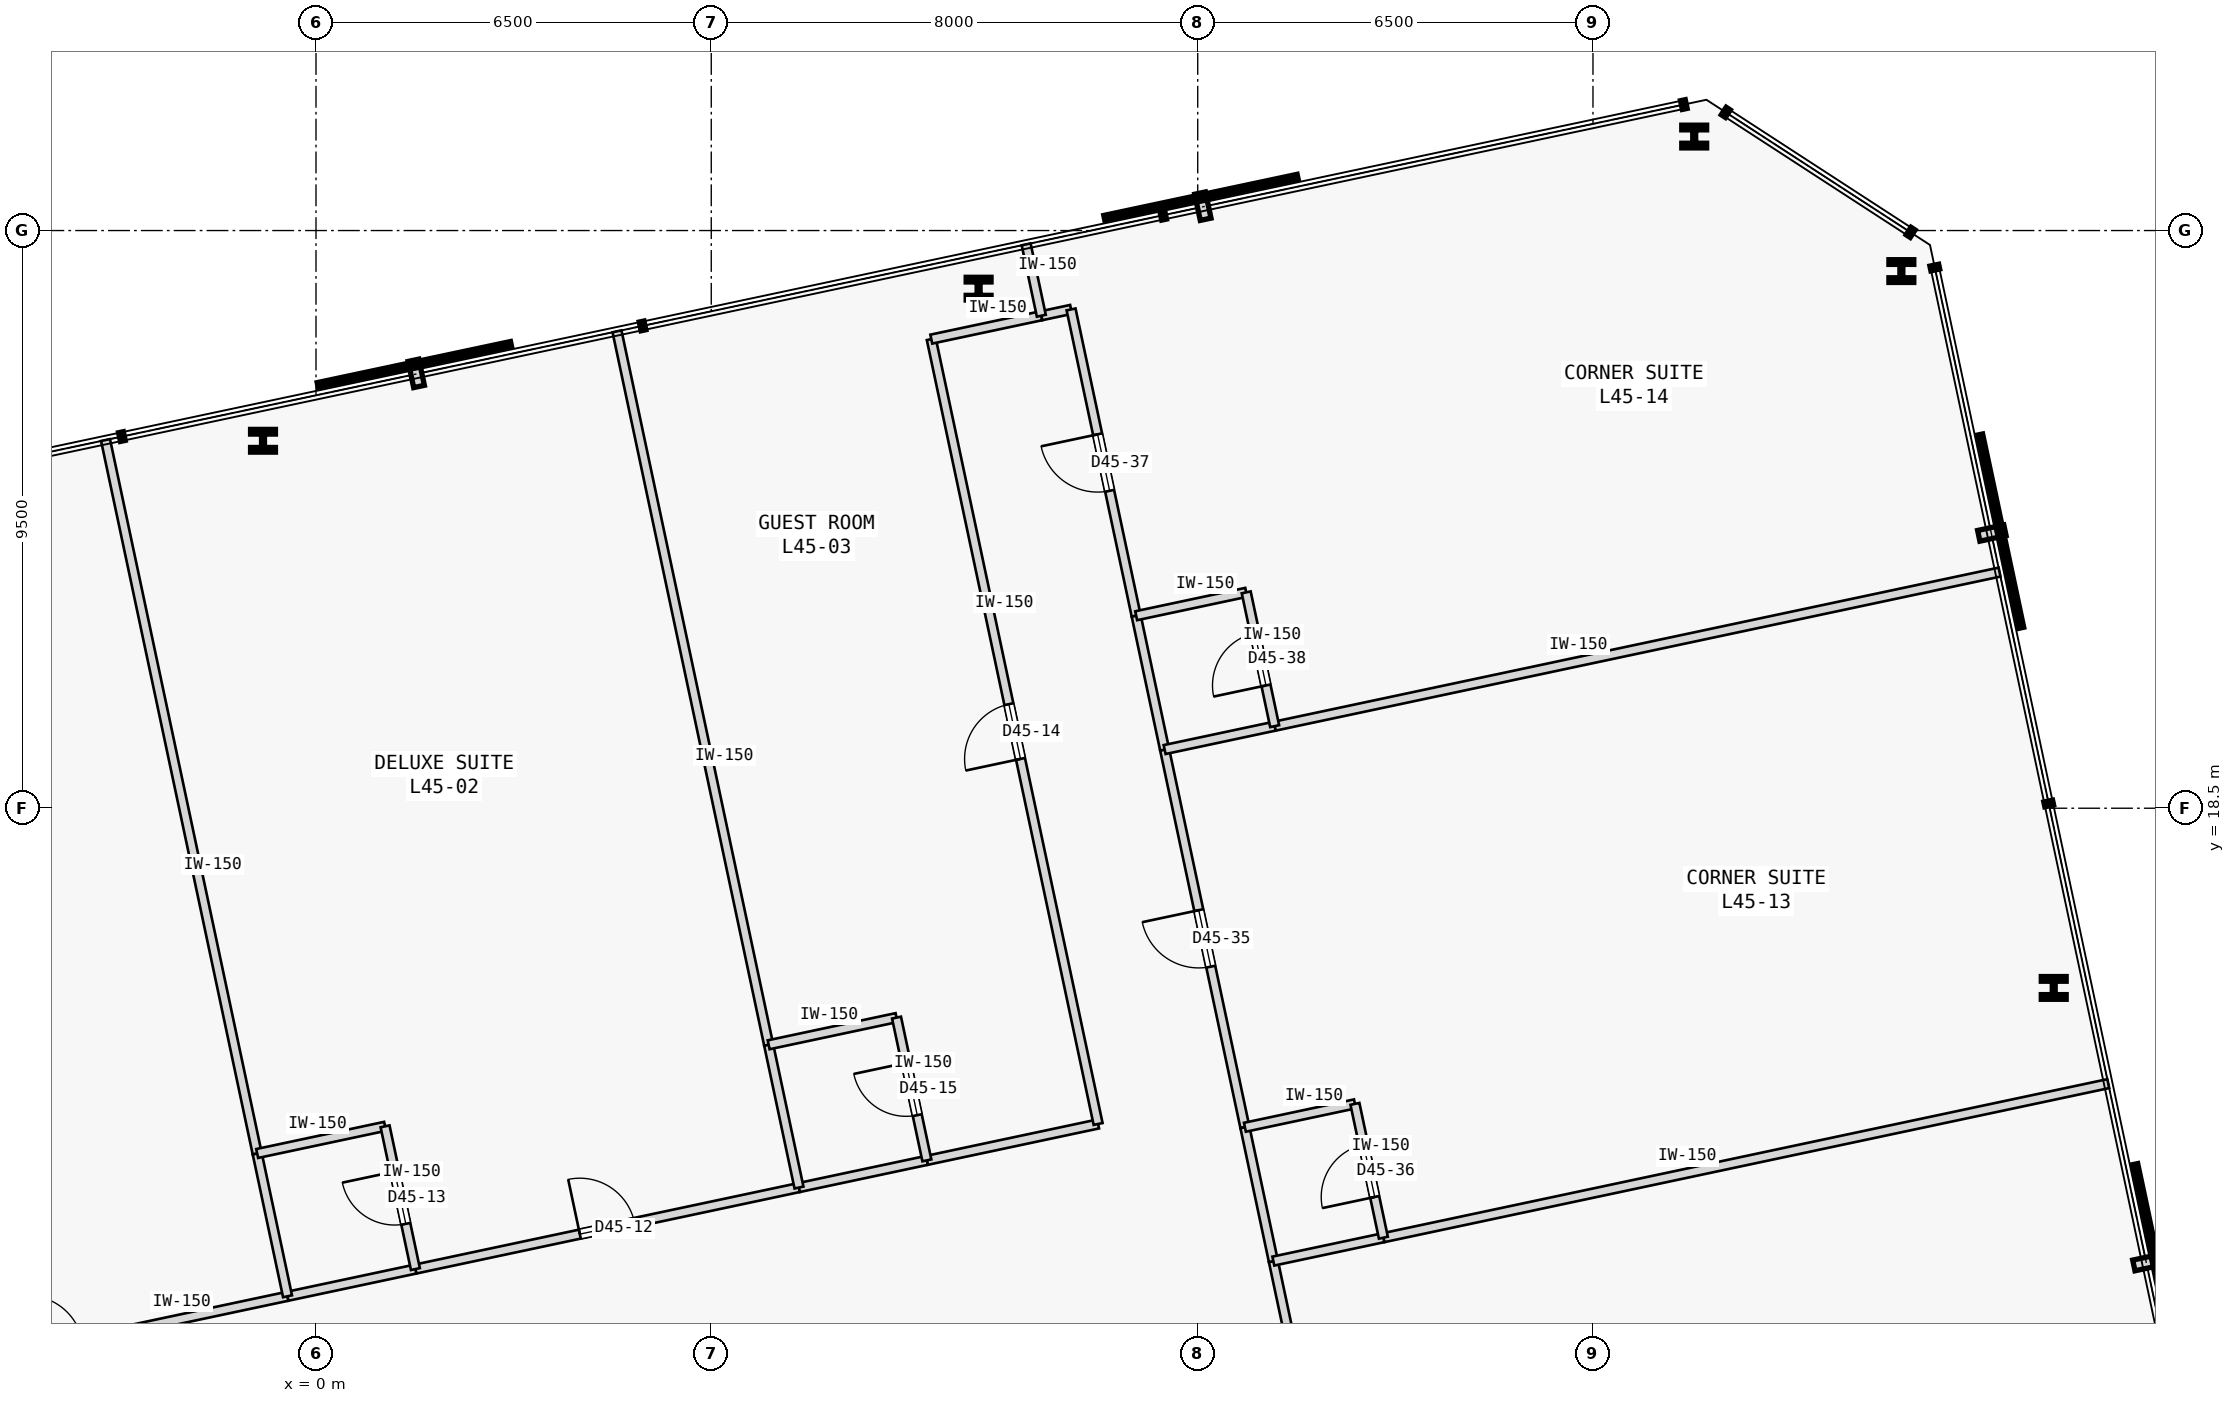
"""IFC4 building model, lengths in metres.
Left out: names, types, materials, properties, quantities, classifications, styles, units other than length and angle.
Written with IfcOpenShell. Run it as: python <this file> out.ifc"""

import sys

from ifc_helpers import new_model, si_unit, direction, frame, frame_2d, origin, origin_2d, place, context, subcontext, project, spatial, rectangle, i_section, extrude, element, fill, save


model = new_model("IFC4")
c1 = context("Model", 3, precision=1e-05, world=origin(), true_north=direction((0.0, 1.0)))
c2 = subcontext(c1, "Body", "Model", "MODEL_VIEW")
j1 = project(units=[si_unit("LENGTHUNIT", "METRE"), si_unit("PLANEANGLEUNIT", "RADIAN")], contexts=[c1])
p1 = place(None, origin())
s1 = spatial("IfcSite", under=j1, at=p1, CompositionType="ELEMENT")
p2 = place(p1, origin())
s2 = spatial("IfcBuilding", under=s1, at=p2, CompositionType="ELEMENT")
p3 = place(p2, frame((0.0, 0.0, 175.2)))
s3 = spatial("IfcBuildingStorey", under=s2, at=p3, CompositionType="ELEMENT", Elevation=175.2)
for number, where, z_axis, x_axis in (
    (1, (28.577, 15.545, 0.0), (0.0, 0.0, 1.0), (1.0, 0.0, 0.0)),
    (2, (26.071, 27.333, 0.0), (0.0, 0.0, 1.0), (1.0, 0.0, 0.0)),
    (3, (22.665, 29.546, 0.0), (0.0, 0.0, 1.0), (1.0, 0.0, 0.0)),
    (4, (10.896, 27.044, 0.0), (0.0, 0.0, 1.0), (1.0, 0.0, 0.0)),
    (5, (-0.872, 24.543, 0.0), (0.0, 0.0, 1.0), (1.0, 0.0, 0.0)),
):
    element("IfcColumn", number, at=place(p3, frame(where, z_axis=z_axis, x_axis=x_axis)), inside=s3, PredefinedType="COLUMN", context=c2, shape_type="SweptSolid", body=[
        extrude(i_section(OverallWidth=0.409, OverallDepth=0.374, WebThickness=0.048, FlangeThickness=0.077, FilletRadius=0.015, at=origin_2d()), origin(), (0.0, 0.0, 1.0), 3.4),
    ])
p4 = place(p3, frame((-8.121, 8.848, 0.0), z_axis=(0.0, 0.0, 1.0), x_axis=(0.978146318695, 0.207917722244, 0.0)))
e6 = element("IfcWall", 6, at=p4, inside=s3, PredefinedType="PARTITIONING", context=c2, shape_type="SweptSolid", body=[
    extrude(rectangle(XDim=7.824, YDim=0.15, at=frame_2d((3.912, 0.0))), origin(), (0.0, 0.0, 1.0), 3.175),
])
p5 = place(p4, frame((3.452, 0.0, 0.0)))
e7 = element("IfcOpeningElement", 7, at=p5, cuts=e6, PredefinedType="OPENING", context=c2, shape_type="SweptSolid", body=[
    extrude(rectangle(XDim=0.92, YDim=2.15, at=frame_2d((0.46, 1.075))), frame((0.0, 0.085, 0.0), z_axis=(0.0, -1.0, 0.0), x_axis=(1.0, 0.0, 0.0)), (0.0, 0.0, 1.0), 0.17),
])
p6 = place(p3, frame((1.635, 10.921, 0.0), z_axis=(0.0, 0.0, 1.0), x_axis=(0.978147881284, 0.207910370927, 0.0)))
e8 = element("IfcWall", 8, at=p6, inside=s3, PredefinedType="PARTITIONING", context=c2, shape_type="SweptSolid", body=[
    extrude(rectangle(XDim=6.449, YDim=0.15, at=frame_2d((3.225, 0.0))), origin(), (0.0, 0.0, 1.0), 3.175),
])
p7 = place(p6, frame((2.764, 0.0, 0.0)))
e9 = element("IfcOpeningElement", 9, at=p7, cuts=e8, PredefinedType="OPENING", context=c2, shape_type="SweptSolid", body=[
    extrude(rectangle(XDim=0.92, YDim=2.15, at=frame_2d((0.46, 1.075))), frame((0.0, 0.085, 0.0), z_axis=(0.0, -1.0, 0.0), x_axis=(1.0, 0.0, 0.0)), (0.0, 0.0, 1.0), 0.17),
])
p8 = place(p3, frame((-0.469, 10.474, 0.0), z_axis=(0.0, 0.0, 1.0), x_axis=(0.978146728319, 0.207915795165, 0.0)))
e10 = element("IfcWall", 10, at=p8, inside=s3, PredefinedType="PARTITIONING", context=c2, shape_type="SweptSolid", body=[
    extrude(rectangle(XDim=2.15, YDim=0.15, at=frame_2d((1.075, 0.0))), origin(), (0.0, 0.0, 1.0), 3.175),
])
p9 = place(p3, frame((10.046, 12.709, 0.0), z_axis=(0.0, 0.0, 1.0), x_axis=(0.97816208355, 0.207843542851, 0.0)))
e11 = element("IfcWall", 11, at=p9, inside=s3, PredefinedType="PARTITIONING", context=c2, shape_type="SweptSolid", body=[
    extrude(rectangle(XDim=2.879, YDim=0.15, at=frame_2d((1.439, 0.0))), origin(), (0.0, 0.0, 1.0), 3.175),
])
p10 = place(p3, frame((12.862, 13.308, 0.0), z_axis=(0.0, 0.0, 1.0), x_axis=(-0.207911421929, 0.978147657888, 0.0)))
e12 = element("IfcWall", 12, at=p10, inside=s3, PredefinedType="PARTITIONING", context=c2, shape_type="SweptSolid", body=[
    extrude(rectangle(XDim=13.195, YDim=0.15, at=frame_2d((6.598, 0.0))), origin(), (0.0, 0.0, 1.0), 3.175),
])
p11 = place(p10, frame((6.137, 0.0, 0.0)))
e13 = element("IfcOpeningElement", 13, at=p11, cuts=e12, PredefinedType="OPENING", context=c2, shape_type="SweptSolid", body=[
    extrude(rectangle(XDim=0.92, YDim=2.15, at=frame_2d((0.46, 1.075))), frame((0.0, 0.085, 0.0), z_axis=(0.0, -1.0, 0.0), x_axis=(1.0, 0.0, 0.0)), (0.0, 0.0, 1.0), 0.17),
])
p12 = place(p3, frame((10.118, 26.214, 0.0), z_axis=(0.0, 0.0, 1.0), x_axis=(0.978133353907, 0.20797870558, 0.0)))
e14 = element("IfcWall", 14, at=p12, inside=s3, PredefinedType="PARTITIONING", context=c2, shape_type="SweptSolid", body=[
    extrude(rectangle(XDim=1.85, YDim=0.15, at=frame_2d((0.925, 0.0))), origin(), (0.0, 0.0, 1.0), 3.175),
])
p13 = place(p3, frame((7.943, 12.262, 0.0), z_axis=(0.0, 0.0, 1.0), x_axis=(0.978146728319, 0.207915795165, 0.0)))
e15 = element("IfcWall", 15, at=p13, inside=s3, PredefinedType="PARTITIONING", context=c2, shape_type="SweptSolid", body=[
    extrude(rectangle(XDim=2.15, YDim=0.15, at=frame_2d((1.075, 0.0))), origin(), (0.0, 0.0, 1.0), 3.175),
])
p14 = place(p3, frame((17.064, 4.841, 0.0), z_axis=(0.0, 0.0, 1.0), x_axis=(-0.207924511115, 0.978144875608, 0.0)))
e16 = element("IfcWall", 16, at=p14, inside=s3, PredefinedType="PARTITIONING", context=c2, shape_type="SweptSolid", body=[
    extrude(rectangle(XDim=6.35, YDim=0.15, at=frame_2d((3.175, 0.0))), origin(), (0.0, 0.0, 1.0), 3.175),
])
p15 = place(p14, frame((2.7, 0.0, 0.0)))
e17 = element("IfcOpeningElement", 17, at=p15, cuts=e16, PredefinedType="OPENING", context=c2, shape_type="SweptSolid", body=[
    extrude(rectangle(XDim=0.95, YDim=2.15, at=frame_2d((0.475, 1.075))), frame((0.0, 0.085, 0.0), z_axis=(0.0, -1.0, 0.0), x_axis=(1.0, 0.0, 0.0)), (0.0, 0.0, 1.0), 0.17),
])
p16 = place(p3, frame((15.276, 13.253, 0.0), z_axis=(0.0, 0.0, 1.0), x_axis=(-0.207924511115, 0.978144875608, 0.0)))
e18 = element("IfcWall", 18, at=p16, inside=s3, PredefinedType="PARTITIONING", context=c2, shape_type="SweptSolid", body=[
    extrude(rectangle(XDim=6.35, YDim=0.15, at=frame_2d((3.175, 0.0))), origin(), (0.0, 0.0, 1.0), 3.175),
])
p17 = place(p16, frame((2.7, 0.0, 0.0)))
e19 = element("IfcOpeningElement", 19, at=p17, cuts=e18, PredefinedType="OPENING", context=c2, shape_type="SweptSolid", body=[
    extrude(rectangle(XDim=0.95, YDim=2.15, at=frame_2d((0.475, 1.075))), frame((0.0, 0.085, 0.0), z_axis=(0.0, -1.0, 0.0), x_axis=(1.0, 0.0, 0.0)), (0.0, 0.0, 1.0), 0.17),
])
p18 = place(p3, frame((15.744, 11.052, 0.0), z_axis=(0.0, 0.0, 1.0), x_axis=(-0.207891197838, 0.978151956427, 0.0)))
e20 = element("IfcWall", 20, at=p18, inside=s3, PredefinedType="PARTITIONING", context=c2, shape_type="SweptSolid", body=[
    extrude(rectangle(XDim=2.25, YDim=0.15, at=frame_2d((1.125, 0.0))), origin(), (0.0, 0.0, 1.0), 3.175),
])
p19 = place(p3, frame((11.928, 26.599, 0.0), z_axis=(0.0, 0.0, 1.0), x_axis=(0.97822210712, 0.207560856478, 0.0)))
e21 = element("IfcWall", 21, at=p19, inside=s3, PredefinedType="PARTITIONING", context=c2, shape_type="SweptSolid", body=[
    extrude(rectangle(XDim=0.5, YDim=0.15, at=frame_2d((0.25, 0.0))), origin(), (0.0, 0.0, 1.0), 3.175),
])
p20 = place(p3, frame((13.488, 21.666, 0.0), z_axis=(0.0, 0.0, 1.0), x_axis=(-0.207926226209, 0.978144511028, 0.0)))
e22 = element("IfcWall", 22, at=p20, inside=s3, PredefinedType="PARTITIONING", context=c2, shape_type="SweptSolid", body=[
    extrude(rectangle(XDim=5.15, YDim=0.15, at=frame_2d((2.575, 0.0))), origin(), (0.0, 0.0, 1.0), 3.175),
])
p21 = place(p20, frame((2.1, 0.0, 0.0)))
e23 = element("IfcOpeningElement", 23, at=p21, cuts=e22, PredefinedType="OPENING", context=c2, shape_type="SweptSolid", body=[
    extrude(rectangle(XDim=0.95, YDim=2.15, at=frame_2d((0.475, 1.075))), frame((0.0, 0.085, 0.0), z_axis=(0.0, -1.0, 0.0), x_axis=(1.0, 0.0, 0.0)), (0.0, 0.0, 1.0), 0.17),
])
p22 = place(p3, frame((13.956, 19.465, 0.0), z_axis=(0.0, 0.0, 1.0), x_axis=(-0.207891197838, 0.978151956427, 0.0)))
e24 = element("IfcWall", 24, at=p22, inside=s3, PredefinedType="PARTITIONING", context=c2, shape_type="SweptSolid", body=[
    extrude(rectangle(XDim=2.25, YDim=0.15, at=frame_2d((1.125, 0.0))), origin(), (0.0, 0.0, 1.0), 3.175),
])
p23 = place(p3, frame((-0.967, 12.822, 0.0), z_axis=(0.0, 0.0, 1.0), x_axis=(-0.207914988081, 0.978146899873, 0.0)))
e25 = element("IfcWall", 25, at=p23, inside=s3, PredefinedType="PARTITIONING", context=c2, shape_type="SweptSolid", body=[
    extrude(rectangle(XDim=11.995, YDim=0.15, at=frame_2d((5.998, 0.0))), origin(), (0.0, 0.0, 1.0), 3.175),
])
p24 = place(p3, frame((-0.469, 10.474, 0.0), z_axis=(0.0, 0.0, 1.0), x_axis=(-0.207819824493, 0.978167123015, 0.0)))
e26 = element("IfcWall", 26, at=p24, inside=s3, PredefinedType="PARTITIONING", context=c2, shape_type="SweptSolid", body=[
    extrude(rectangle(XDim=2.4, YDim=0.15, at=frame_2d((1.2, 0.0))), origin(), (0.0, 0.0, 1.0), 3.175),
])
p25 = place(p3, frame((-0.967, 12.822, 0.0), z_axis=(0.0, 0.0, 1.0), x_axis=(0.978169816376, 0.207807146966, 0.0)))
e27 = element("IfcWall", 27, at=p25, inside=s3, PredefinedType="PARTITIONING", context=c2, shape_type="SweptSolid", body=[
    extrude(rectangle(XDim=2.15, YDim=0.15, at=frame_2d((1.075, 0.0))), origin(), (0.0, 0.0, 1.0), 3.175),
])
p26 = place(p3, frame((1.635, 10.921, 0.0), z_axis=(0.0, 0.0, 1.0), x_axis=(-0.207840504985, 0.978162729042, 0.0)))
e28 = element("IfcWall", 28, at=p26, inside=s3, PredefinedType="PARTITIONING", context=c2, shape_type="SweptSolid", body=[
    extrude(rectangle(XDim=2.4, YDim=0.15, at=frame_2d((1.2, 0.0))), origin(), (0.0, 0.0, 1.0), 3.175),
])
p27 = place(p26, frame((0.76, 0.0, 0.0)))
e29 = element("IfcOpeningElement", 29, at=p27, cuts=e28, PredefinedType="OPENING", context=c2, shape_type="SweptSolid", body=[
    extrude(rectangle(XDim=0.88, YDim=2.15, at=frame_2d((0.44, 1.075))), frame((0.0, 0.085, 0.0), z_axis=(0.0, -1.0, 0.0), x_axis=(1.0, 0.0, 0.0)), (0.0, 0.0, 1.0), 0.17),
])
p28 = place(p3, frame((7.444, 14.61, 0.0), z_axis=(0.0, 0.0, 1.0), x_axis=(-0.207910848762, 0.978147779718, 0.0)))
e30 = element("IfcWall", 30, at=p28, inside=s3, PredefinedType="PARTITIONING", context=c2, shape_type="SweptSolid", body=[
    extrude(rectangle(XDim=11.995, YDim=0.15, at=frame_2d((5.998, 0.0))), origin(), (0.0, 0.0, 1.0), 3.175),
])
p29 = place(p3, frame((7.943, 12.262, 0.0), z_axis=(0.0, 0.0, 1.0), x_axis=(-0.207937840262, 0.978142042133, 0.0)))
e31 = element("IfcWall", 31, at=p29, inside=s3, PredefinedType="PARTITIONING", context=c2, shape_type="SweptSolid", body=[
    extrude(rectangle(XDim=2.4, YDim=0.15, at=frame_2d((1.2, 0.0))), origin(), (0.0, 0.0, 1.0), 3.175),
])
p30 = place(p3, frame((7.444, 14.61, 0.0), z_axis=(0.0, 0.0, 1.0), x_axis=(0.978151636287, 0.207892704126, 0.0)))
e32 = element("IfcWall", 32, at=p30, inside=s3, PredefinedType="PARTITIONING", context=c2, shape_type="SweptSolid", body=[
    extrude(rectangle(XDim=2.15, YDim=0.15, at=frame_2d((1.075, 0.0))), origin(), (0.0, 0.0, 1.0), 3.175),
])
p31 = place(p3, frame((10.046, 12.709, 0.0), z_axis=(0.0, 0.0, 1.0), x_axis=(-0.207840504985, 0.978162729042, 0.0)))
e33 = element("IfcWall", 33, at=p31, inside=s3, PredefinedType="PARTITIONING", context=c2, shape_type="SweptSolid", body=[
    extrude(rectangle(XDim=2.4, YDim=0.15, at=frame_2d((1.2, 0.0))), origin(), (0.0, 0.0, 1.0), 3.175),
])
p32 = place(p31, frame((0.76, 0.0, 0.0)))
e34 = element("IfcOpeningElement", 34, at=p32, cuts=e33, PredefinedType="OPENING", context=c2, shape_type="SweptSolid", body=[
    extrude(rectangle(XDim=0.88, YDim=2.15, at=frame_2d((0.44, 1.075))), frame((0.0, 0.085, 0.0), z_axis=(0.0, -1.0, 0.0), x_axis=(1.0, 0.0, 0.0)), (0.0, 0.0, 1.0), 0.17),
])
p33 = place(p3, frame((11.928, 26.599, 0.0), z_axis=(0.0, 0.0, 1.0), x_axis=(-0.20795853359, 0.978137642823, 0.0)))
e35 = element("IfcWall", 35, at=p33, inside=s3, PredefinedType="PARTITIONING", context=c2, shape_type="SweptSolid", body=[
    extrude(rectangle(XDim=1.2, YDim=0.15, at=frame_2d((0.6, 0.0))), origin(), (0.0, 0.0, 1.0), 3.175),
])
p34 = place(p3, frame((17.553, 11.437, 0.0), z_axis=(0.0, 0.0, 1.0), x_axis=(0.97814556055, 0.207921288896, 0.0)))
e36 = element("IfcWall", 36, at=p34, inside=s3, PredefinedType="PARTITIONING", context=c2, shape_type="SweptSolid", body=[
    extrude(rectangle(XDim=12.187, YDim=0.15, at=frame_2d((6.094, 0.0))), origin(), (0.0, 0.0, 1.0), 3.175),
])
for number, where, z_axis, x_axis in (
    (37, (15.744, 11.052, 0.0), (0.0, 0.0, 1.0), (0.978, 0.208, 0.0)),
    (38, (15.276, 13.253, 0.0), (0.0, 0.0, 1.0), (0.978, 0.208, 0.0)),
):
    element("IfcWall", number, at=place(p3, frame(where, z_axis=z_axis, x_axis=x_axis)), inside=s3, PredefinedType="PARTITIONING", context=c2, shape_type="SweptSolid", body=[
        extrude(rectangle(XDim=1.85, YDim=0.15, at=frame_2d((0.925, 0.0))), origin(), (0.0, 0.0, 1.0), 3.175),
    ])
p35 = place(p3, frame((17.553, 11.437, 0.0), z_axis=(0.0, 0.0, 1.0), x_axis=(-0.207891197838, 0.978151956427, 0.0)))
e39 = element("IfcWall", 39, at=p35, inside=s3, PredefinedType="PARTITIONING", context=c2, shape_type="SweptSolid", body=[
    extrude(rectangle(XDim=2.25, YDim=0.15, at=frame_2d((1.125, 0.0))), origin(), (0.0, 0.0, 1.0), 3.175),
])
p36 = place(p35, frame((0.685, 0.0, 0.0)))
e40 = element("IfcOpeningElement", 40, at=p36, cuts=e39, PredefinedType="OPENING", context=c2, shape_type="SweptSolid", body=[
    extrude(rectangle(XDim=0.88, YDim=2.15, at=frame_2d((0.44, 1.075))), frame((0.0, 0.085, 0.0), z_axis=(0.0, -1.0, 0.0), x_axis=(1.0, 0.0, 0.0)), (0.0, 0.0, 1.0), 0.17),
])
p37 = place(p3, frame((15.765, 19.849, 0.0), z_axis=(0.0, 0.0, 1.0), x_axis=(0.978149634612, 0.207902121941, 0.0)))
e41 = element("IfcWall", 41, at=p37, inside=s3, PredefinedType="PARTITIONING", context=c2, shape_type="SweptSolid", body=[
    extrude(rectangle(XDim=12.187, YDim=0.15, at=frame_2d((6.094, 0.0))), origin(), (0.0, 0.0, 1.0), 3.175),
])
for number, where, z_axis, x_axis in (
    (42, (13.956, 19.465, 0.0), (0.0, 0.0, 1.0), (0.978, 0.208, 0.0)),
    (43, (13.488, 21.666, 0.0), (0.0, 0.0, 1.0), (0.978, 0.208, 0.0)),
):
    element("IfcWall", number, at=place(p3, frame(where, z_axis=z_axis, x_axis=x_axis)), inside=s3, PredefinedType="PARTITIONING", context=c2, shape_type="SweptSolid", body=[
        extrude(rectangle(XDim=1.85, YDim=0.15, at=frame_2d((0.925, 0.0))), origin(), (0.0, 0.0, 1.0), 3.175),
    ])
p38 = place(p3, frame((15.765, 19.849, 0.0), z_axis=(0.0, 0.0, 1.0), x_axis=(-0.207891197838, 0.978151956427, 0.0)))
e44 = element("IfcWall", 44, at=p38, inside=s3, PredefinedType="PARTITIONING", context=c2, shape_type="SweptSolid", body=[
    extrude(rectangle(XDim=2.25, YDim=0.15, at=frame_2d((1.125, 0.0))), origin(), (0.0, 0.0, 1.0), 3.175),
])
p39 = place(p38, frame((0.685, 0.0, 0.0)))
e45 = element("IfcOpeningElement", 45, at=p39, cuts=e44, PredefinedType="OPENING", context=c2, shape_type="SweptSolid", body=[
    extrude(rectangle(XDim=0.88, YDim=2.15, at=frame_2d((0.44, 1.075))), frame((0.0, 0.085, 0.0), z_axis=(0.0, -1.0, 0.0), x_axis=(1.0, 0.0, 0.0)), (0.0, 0.0, 1.0), 0.17),
])
p40 = place(p7, origin())
e46 = element("IfcDoor", 46, at=p40, inside=s3, OperationType="SINGLE_SWING_LEFT", PredefinedType="DOOR", context=c2, shape_type="SweptSolid", body=[
    extrude(rectangle(XDim=0.92, YDim=2.15, at=frame_2d((0.46, 1.075))), frame((0.0, 0.025, 0.0), z_axis=(0.0, -1.0, 0.0), x_axis=(1.0, 0.0, 0.0)), (0.0, 0.0, 1.0), 0.05),
])
fill(e9, e46)
p41 = place(p27, origin())
e47 = element("IfcDoor", 47, at=p41, inside=s3, OperationType="SINGLE_SWING_RIGHT", PredefinedType="DOOR", context=c2, shape_type="SweptSolid", body=[
    extrude(rectangle(XDim=0.88, YDim=2.15, at=frame_2d((0.44, 1.075))), frame((0.0, 0.025, 0.0), z_axis=(0.0, -1.0, 0.0), x_axis=(1.0, 0.0, 0.0)), (0.0, 0.0, 1.0), 0.05),
])
fill(e29, e47)
p42 = place(p11, origin())
e48 = element("IfcDoor", 48, at=p42, inside=s3, OperationType="SINGLE_SWING_LEFT", PredefinedType="DOOR", context=c2, shape_type="SweptSolid", body=[
    extrude(rectangle(XDim=0.92, YDim=2.15, at=frame_2d((0.46, 1.075))), frame((0.0, 0.025, 0.0), z_axis=(0.0, -1.0, 0.0), x_axis=(1.0, 0.0, 0.0)), (0.0, 0.0, 1.0), 0.05),
])
fill(e13, e48)
p43 = place(p32, origin())
e49 = element("IfcDoor", 49, at=p43, inside=s3, OperationType="SINGLE_SWING_RIGHT", PredefinedType="DOOR", context=c2, shape_type="SweptSolid", body=[
    extrude(rectangle(XDim=0.88, YDim=2.15, at=frame_2d((0.44, 1.075))), frame((0.0, 0.025, 0.0), z_axis=(0.0, -1.0, 0.0), x_axis=(1.0, 0.0, 0.0)), (0.0, 0.0, 1.0), 0.05),
])
fill(e34, e49)
p44 = place(p17, origin())
e50 = element("IfcDoor", 50, at=p44, inside=s3, OperationType="SINGLE_SWING_RIGHT", PredefinedType="DOOR", context=c2, shape_type="SweptSolid", body=[
    extrude(rectangle(XDim=0.95, YDim=2.15, at=frame_2d((0.475, 1.075))), frame((0.0, 0.025, 0.0), z_axis=(0.0, -1.0, 0.0), x_axis=(1.0, 0.0, 0.0)), (0.0, 0.0, 1.0), 0.05),
])
fill(e19, e50)
p45 = place(p36, origin())
e51 = element("IfcDoor", 51, at=p45, inside=s3, OperationType="SINGLE_SWING_LEFT", PredefinedType="DOOR", context=c2, shape_type="SweptSolid", body=[
    extrude(rectangle(XDim=0.88, YDim=2.15, at=frame_2d((0.44, 1.075))), frame((0.0, 0.025, 0.0), z_axis=(0.0, -1.0, 0.0), x_axis=(1.0, 0.0, 0.0)), (0.0, 0.0, 1.0), 0.05),
])
fill(e40, e51)
p46 = place(p21, origin())
e52 = element("IfcDoor", 52, at=p46, inside=s3, OperationType="SINGLE_SWING_RIGHT", PredefinedType="DOOR", context=c2, shape_type="SweptSolid", body=[
    extrude(rectangle(XDim=0.95, YDim=2.15, at=frame_2d((0.475, 1.075))), frame((0.0, 0.025, 0.0), z_axis=(0.0, -1.0, 0.0), x_axis=(1.0, 0.0, 0.0)), (0.0, 0.0, 1.0), 0.05),
])
fill(e23, e52)
p47 = place(p39, origin())
e53 = element("IfcDoor", 53, at=p47, inside=s3, OperationType="SINGLE_SWING_LEFT", PredefinedType="DOOR", context=c2, shape_type="SweptSolid", body=[
    extrude(rectangle(XDim=0.88, YDim=2.15, at=frame_2d((0.44, 1.075))), frame((0.0, 0.025, 0.0), z_axis=(0.0, -1.0, 0.0), x_axis=(1.0, 0.0, 0.0)), (0.0, 0.0, 1.0), 0.05),
])
fill(e45, e53)
save(model, sys.argv[1])
